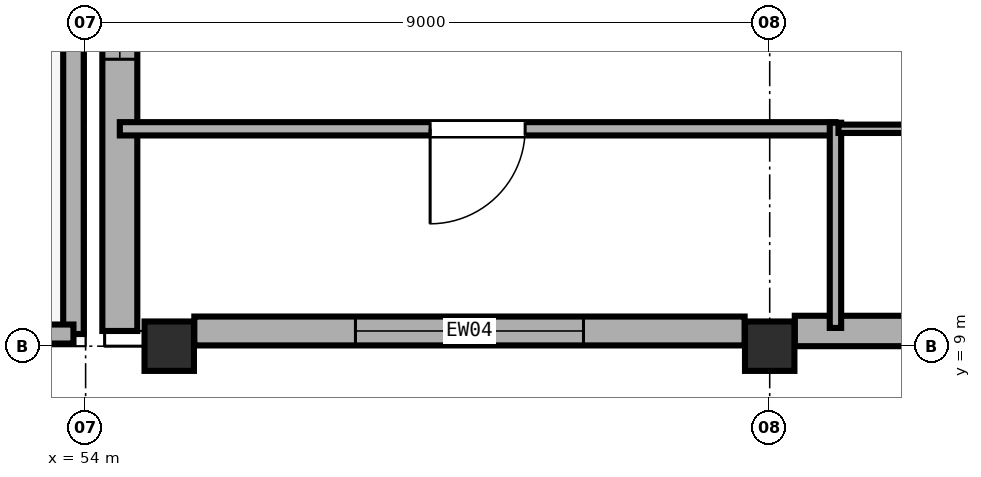
"""IFC4 building model, lengths in metres.
Left out: names, types, materials, properties, quantities, classifications, styles, units other than length and angle.
Written with IfcOpenShell. Run it as: python <this file> out.ifc"""

import sys

from ifc_helpers import new_model, si_unit, direction, frame, frame_2d, origin, origin_2d, place, context, subcontext, project, spatial, rectangle, extrude, element, fill, save


model = new_model("IFC4")
c1 = context("Model", 3, precision=1e-05, world=origin(), true_north=direction((0.0, 1.0)))
c2 = subcontext(c1, "Body", "Model", "MODEL_VIEW")
j1 = project(units=[si_unit("LENGTHUNIT", "METRE"), si_unit("PLANEANGLEUNIT", "RADIAN")], contexts=[c1])
p1 = place(None, origin())
s1 = spatial("IfcSite", under=j1, at=p1, CompositionType="ELEMENT")
p2 = place(p1, origin())
s2 = spatial("IfcBuilding", under=s1, at=p2, CompositionType="ELEMENT")
p3 = place(p2, frame((0.0, 0.0, 14.4)))
s3 = spatial("IfcBuildingStorey", under=s2, at=p3, CompositionType="ELEMENT", Elevation=14.4)
for number, where, z_axis, x_axis in (
    (1, (55.1, 9.0, 0.0), (0.0, 0.0, 1.0), (1.0, 0.0, 0.0)),
    (2, (63.0, 9.0, 0.0), (0.0, 0.0, 1.0), (1.0, 0.0, 0.0)),
):
    element("IfcColumn", number, at=place(p3, frame(where, z_axis=z_axis, x_axis=x_axis)), inside=s3, PredefinedType="COLUMN", context=c2, shape_type="SweptSolid", body=[
        extrude(rectangle(XDim=0.65, YDim=0.65, at=origin_2d()), origin(), (0.0, 0.0, 1.0), 4.8),
    ])
p4 = place(p3, frame((54.45, 9.2, 0.0), z_axis=(0.0, 0.0, 1.0), x_axis=(0.0, 1.0, 0.0)))
e3 = element("IfcWall", 3, at=p4, inside=s3, PredefinedType="SOLIDWALL", context=c2, shape_type="SweptSolid", body=[
    extrude(rectangle(XDim=8.8, YDim=0.46, at=frame_2d((4.4, 0.0))), origin(), (0.0, 0.0, 1.0), 3.58),
])
p5 = place(p4, frame((3.575, 0.0, 0.9)))
e4 = element("IfcOpeningElement", 4, at=p5, cuts=e3, PredefinedType="OPENING", context=c2, shape_type="SweptSolid", body=[
    extrude(rectangle(XDim=1.65, YDim=1.9, at=frame_2d((0.825, 0.95))), frame((0.0, 0.24, 0.0), z_axis=(0.0, -1.0, 0.0), x_axis=(1.0, 0.0, 0.0)), (0.0, 0.0, 1.0), 0.48),
])
p6 = place(p3, frame((71.67, 9.2, 0.0), z_axis=(0.0, 0.0, 1.0), x_axis=(-1.0, 0.0, 0.0)))
e5 = element("IfcWall", 5, at=p6, inside=s3, PredefinedType="SOLIDWALL", context=c2, shape_type="SweptSolid", body=[
    extrude(rectangle(XDim=8.34, YDim=0.4, at=frame_2d((4.17, 0.0))), origin(), (0.0, 0.0, 1.0), 3.58),
])
p7 = place(p6, frame((2.72, 0.0, 0.9)))
e6 = element("IfcOpeningElement", 6, at=p7, cuts=e5, PredefinedType="OPENING", context=c2, shape_type="SweptSolid", body=[
    extrude(rectangle(XDim=2.9, YDim=2.2, at=frame_2d((1.45, 1.1))), frame((0.0, 0.21, 0.0), z_axis=(0.0, -1.0, 0.0), x_axis=(1.0, 0.0, 0.0)), (0.0, 0.0, 1.0), 0.42),
])
p8 = place(p3, frame((62.67, 9.2, 0.0), z_axis=(0.0, 0.0, 1.0), x_axis=(-1.0, 0.0, 0.0)))
e7 = element("IfcWall", 7, at=p8, inside=s3, PredefinedType="SOLIDWALL", context=c2, shape_type="SweptSolid", body=[
    extrude(rectangle(XDim=7.24, YDim=0.38, at=frame_2d((3.62, 0.0))), origin(), (0.0, 0.0, 1.0), 3.58),
])
p9 = place(p8, frame((2.12, 0.0, 0.9)))
e8 = element("IfcOpeningElement", 8, at=p9, cuts=e7, PredefinedType="OPENING", context=c2, shape_type="SweptSolid", body=[
    extrude(rectangle(XDim=3.0, YDim=2.2, at=frame_2d((1.5, 1.1))), frame((0.0, 0.2, 0.0), z_axis=(0.0, -1.0, 0.0), x_axis=(1.0, 0.0, 0.0)), (0.0, 0.0, 1.0), 0.4),
])
p10 = place(p3, frame((53.84, 26.34, 0.0), z_axis=(0.0, 0.0, 1.0), x_axis=(0.0, -1.0, 0.0)))
e9 = element("IfcWall", 9, at=p10, inside=s3, PredefinedType="PARAPET", context=c2, shape_type="SweptSolid", body=[
    extrude(rectangle(XDim=17.18, YDim=0.27, at=frame_2d((8.59, 0.0))), origin(), (0.0, 0.0, 1.0), 0.65),
])
p11 = place(p3, frame((53.84, 9.16, 0.0), z_axis=(0.0, 0.0, 1.0), x_axis=(-1.0, 0.0, 0.0)))
e10 = element("IfcWall", 10, at=p11, inside=s3, PredefinedType="PARAPET", context=c2, shape_type="SweptSolid", body=[
    extrude(rectangle(XDim=17.18, YDim=0.25, at=frame_2d((8.59, 0.0))), origin(), (0.0, 0.0, 1.0), 0.65),
])
p12 = place(p3, frame((63.865, 11.86, 0.0), z_axis=(0.0, 0.0, 1.0), x_axis=(-1.0, 0.0, 0.0)))
e11 = element("IfcWall", 11, at=p12, inside=s3, PredefinedType="PARTITIONING", context=c2, shape_type="SweptSolid", body=[
    extrude(rectangle(XDim=9.415, YDim=0.175, at=frame_2d((4.708, 0.0))), origin(), (0.0, 0.0, 1.0), 3.56),
])
p13 = place(p12, frame((4.083, 0.0, 0.0)))
e12 = element("IfcOpeningElement", 12, at=p13, cuts=e11, PredefinedType="OPENING", context=c2, shape_type="SweptSolid", body=[
    extrude(rectangle(XDim=1.25, YDim=2.15, at=frame_2d((0.625, 1.075))), frame((0.0, 0.097, 0.0), z_axis=(0.0, -1.0, 0.0), x_axis=(1.0, 0.0, 0.0)), (0.0, 0.0, 1.0), 0.195),
])
p14 = place(p3, frame((63.865, 11.94, 0.0), z_axis=(0.0, 0.0, 1.0), x_axis=(0.0, -1.0, 0.0)))
e13 = element("IfcWall", 13, at=p14, inside=s3, PredefinedType="PARTITIONING", context=c2, shape_type="SweptSolid", body=[
    extrude(rectangle(XDim=2.7, YDim=0.15, at=frame_2d((1.35, 0.0))), origin(), (0.0, 0.0, 1.0), 3.56),
])
p15 = place(p3, frame((63.905, 11.86, 0.0), z_axis=(0.0, 0.0, 1.0), x_axis=(1.0, 0.0, 0.0)))
e14 = element("IfcWall", 14, at=p15, inside=s3, PredefinedType="PARTITIONING", context=c2, shape_type="SweptSolid", body=[
    extrude(rectangle(XDim=9.335, YDim=0.11, at=frame_2d((4.667, 0.0))), origin(), (0.0, 0.0, 1.0), 3.56),
])
p16 = place(p5, origin())
e15 = element("IfcWindow", 15, at=p16, inside=s3, PartitioningType="SINGLE_PANEL", PredefinedType="WINDOW", context=c2, shape_type="SweptSolid", body=[
    extrude(rectangle(XDim=1.65, YDim=1.9, at=frame_2d((0.825, 0.95))), frame((0.0, 0.03, 0.0), z_axis=(0.0, -1.0, 0.0), x_axis=(1.0, 0.0, 0.0)), (0.0, 0.0, 1.0), 0.06),
])
fill(e4, e15)
p17 = place(p9, origin())
e16 = element("IfcWindow", 16, at=p17, inside=s3, PartitioningType="DOUBLE_PANEL_VERTICAL", PredefinedType="WINDOW", context=c2, shape_type="SweptSolid", body=[
    extrude(rectangle(XDim=3.0, YDim=2.2, at=frame_2d((1.5, 1.1))), frame((0.0, 0.03, 0.0), z_axis=(0.0, -1.0, 0.0), x_axis=(1.0, 0.0, 0.0)), (0.0, 0.0, 1.0), 0.06),
])
fill(e8, e16)
p18 = place(p13, origin())
e17 = element("IfcDoor", 17, at=p18, inside=s3, OperationType="SINGLE_SWING_RIGHT", PredefinedType="DOOR", context=c2, shape_type="SweptSolid", body=[
    extrude(rectangle(XDim=1.25, YDim=2.15, at=frame_2d((0.625, 1.075))), frame((0.0, 0.025, 0.0), z_axis=(0.0, -1.0, 0.0), x_axis=(1.0, 0.0, 0.0)), (0.0, 0.0, 1.0), 0.05),
])
fill(e12, e17)
save(model, sys.argv[1])
